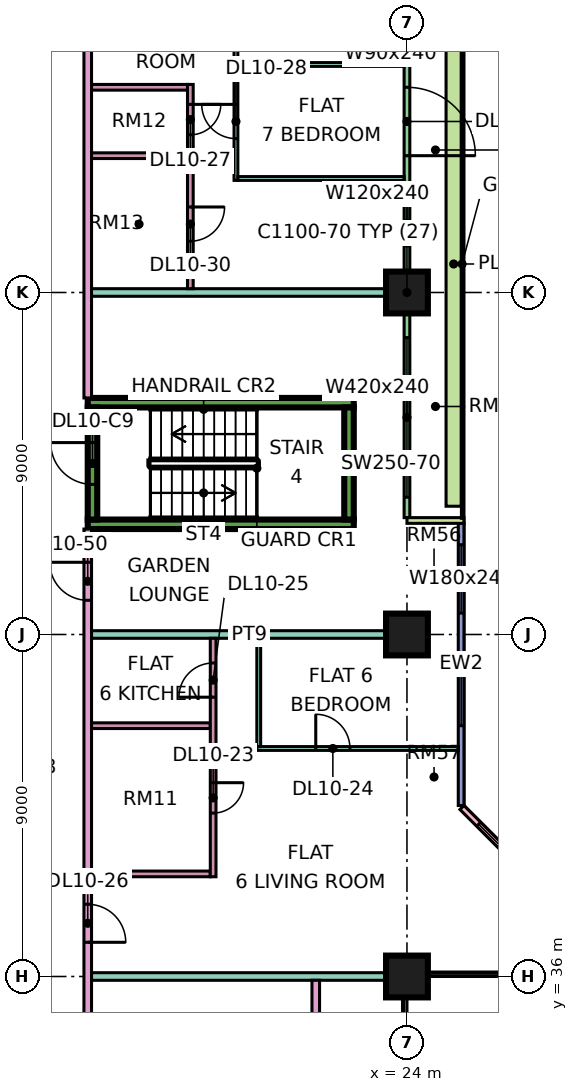
"""IFC4 building model, lengths in metres.
Left out: names, types, materials, properties, quantities, classifications, styles, units other than length and angle.
Written with IfcOpenShell. Run it as: python <this file> out.ifc"""

import sys

from ifc_helpers import new_model, si_unit, direction, frame, frame_2d, origin, origin_2d, place, context, subcontext, project, spatial, rectangle, extrude, element, fill, save


model = new_model("IFC4")
c1 = context("Model", 3, precision=1e-05, world=origin(), true_north=direction((0.0, 1.0)))
c2 = subcontext(c1, "Body", "Model", "MODEL_VIEW")
j1 = project(units=[si_unit("LENGTHUNIT", "METRE"), si_unit("PLANEANGLEUNIT", "RADIAN")], contexts=[c1])
p1 = place(None, origin())
s1 = spatial("IfcSite", under=j1, at=p1, CompositionType="ELEMENT")
p2 = place(p1, origin())
s2 = spatial("IfcBuilding", under=s1, at=p2, CompositionType="ELEMENT")
p3 = place(p2, frame((0.0, 0.0, 52.65)))
s3 = spatial("IfcBuildingStorey", under=s2, at=p3, CompositionType="ELEMENT", Elevation=52.65)
for number, where, z_axis, x_axis in (
    (1, (24.0, 36.0, 0.0), (0.0, 0.0, 1.0), (1.0, 0.0, 0.0)),
    (2, (24.0, 45.0, 0.0), (0.0, 0.0, 1.0), (1.0, 0.0, 0.0)),
    (3, (24.0, 54.0, 0.0), (0.0, 0.0, 1.0), (1.0, 0.0, 0.0)),
):
    element("IfcColumn", number, at=place(p3, frame(where, z_axis=z_axis, x_axis=x_axis)), inside=s3, PredefinedType="COLUMN", context=c2, shape_type="SweptSolid", body=[
        extrude(rectangle(XDim=1.1, YDim=1.1, at=origin_2d()), origin(), (0.0, 0.0, 1.0), 3.75),
    ])
for number, where, z_axis, x_axis in (
    (4, (15.6, 47.9, 0.0), (0.0, 0.0, 1.0), (1.0, 0.0, 0.0)),
    (5, (15.6, 51.1, 0.0), (0.0, 0.0, 1.0), (1.0, 0.0, 0.0)),
):
    element("IfcWall", number, at=place(p3, frame(where, z_axis=z_axis, x_axis=x_axis)), inside=s3, PredefinedType="SHEAR", context=c2, shape_type="SweptSolid", body=[
        extrude(rectangle(XDim=7.0, YDim=0.25, at=frame_2d((3.5, 0.0))), origin(), (0.0, 0.0, 1.0), 3.75),
    ])
p4 = place(p3, frame((15.725, 48.025, 0.0), z_axis=(0.0, 0.0, 1.0), x_axis=(0.0, 1.0, 0.0)))
e6 = element("IfcWall", 6, at=p4, inside=s3, PredefinedType="SHEAR", context=c2, shape_type="SweptSolid", body=[
    extrude(rectangle(XDim=2.95, YDim=0.25, at=frame_2d((1.475, 0.0))), origin(), (0.0, 0.0, 1.0), 3.75),
])
p5 = place(p4, frame((0.925, 0.0, 0.0)))
e7 = element("IfcOpeningElement", 7, at=p5, cuts=e6, PredefinedType="OPENING", context=c2, shape_type="SweptSolid", body=[
    extrude(rectangle(XDim=1.1, YDim=2.2, at=frame_2d((0.55, 1.1))), frame((0.0, 0.135, 0.0), z_axis=(0.0, -1.0, 0.0), x_axis=(1.0, 0.0, 0.0)), (0.0, 0.0, 1.0), 0.27),
])
p6 = place(p3, frame((22.475, 48.025, 0.0), z_axis=(0.0, 0.0, 1.0), x_axis=(0.0, 1.0, 0.0)))
e8 = element("IfcWall", 8, at=p6, inside=s3, PredefinedType="SHEAR", context=c2, shape_type="SweptSolid", body=[
    extrude(rectangle(XDim=2.95, YDim=0.25, at=frame_2d((1.475, 0.0))), origin(), (0.0, 0.0, 1.0), 3.75),
])
p7 = place(p3, frame((28.447, 37.447, 0.0), z_axis=(0.0, 0.0, 1.0), x_axis=(-0.707106781187, 0.707106781187, 0.0)))
e9 = element("IfcWall", 9, at=p7, inside=s3, PredefinedType="SOLIDWALL", context=c2, shape_type="SweptSolid", body=[
    extrude(rectangle(XDim=4.243, YDim=0.15, at=frame_2d((2.121, 0.0))), origin(), (0.0, 0.0, 1.0), 3.35),
])
p8 = place(p7, frame((0.621, 0.0, 0.45)))
e10 = element("IfcOpeningElement", 10, at=p8, cuts=e9, PredefinedType="OPENING", context=c2, shape_type="SweptSolid", body=[
    extrude(rectangle(XDim=3.0, YDim=2.4, at=frame_2d((1.5, 1.2))), frame((0.0, 0.085, 0.0), z_axis=(0.0, -1.0, 0.0), x_axis=(1.0, 0.0, 0.0)), (0.0, 0.0, 1.0), 0.17),
])
p9 = place(p3, frame((25.425, 40.5, 0.0), z_axis=(0.0, 0.0, 1.0), x_axis=(0.0, 1.0, 0.0)))
e11 = element("IfcWall", 11, at=p9, inside=s3, PredefinedType="SOLIDWALL", context=c2, shape_type="SweptSolid", body=[
    extrude(rectangle(XDim=7.425, YDim=0.15, at=frame_2d((3.712, 0.0))), origin(), (0.0, 0.0, 1.0), 3.35),
])
p10 = place(p9, frame((2.1, 0.0, 0.45)))
e12 = element("IfcOpeningElement", 12, at=p10, cuts=e11, PredefinedType="OPENING", context=c2, shape_type="SweptSolid", body=[
    extrude(rectangle(XDim=1.8, YDim=2.4, at=frame_2d((0.9, 1.2))), frame((0.0, 0.085, 0.0), z_axis=(0.0, -1.0, 0.0), x_axis=(1.0, 0.0, 0.0)), (0.0, 0.0, 1.0), 0.17),
])
p11 = place(p9, frame((5.062, 0.0, 0.45)))
e13 = element("IfcOpeningElement", 13, at=p11, cuts=e11, PredefinedType="OPENING", context=c2, shape_type="SweptSolid", body=[
    extrude(rectangle(XDim=1.8, YDim=2.4, at=frame_2d((0.9, 1.2))), frame((0.0, 0.085, 0.0), z_axis=(0.0, -1.0, 0.0), x_axis=(1.0, 0.0, 0.0)), (0.0, 0.0, 1.0), 0.17),
])
p12 = place(p3, frame((24.0, 48.075, 0.0), z_axis=(0.0, 0.0, 1.0), x_axis=(0.0, 1.0, 0.0)))
e14 = element("IfcWall", 14, at=p12, inside=s3, PredefinedType="SOLIDWALL", context=c2, shape_type="SweptSolid", body=[
    extrude(rectangle(XDim=13.35, YDim=0.15, at=frame_2d((6.675, 0.0))), origin(), (0.0, 0.0, 1.0), 3.35),
])
p13 = place(p12, frame((0.538, 0.0, 0.45)))
e15 = element("IfcOpeningElement", 15, at=p13, cuts=e14, PredefinedType="OPENING", context=c2, shape_type="SweptSolid", body=[
    extrude(rectangle(XDim=4.2, YDim=2.4, at=frame_2d((2.1, 1.2))), frame((0.0, 0.085, 0.0), z_axis=(0.0, -1.0, 0.0), x_axis=(1.0, 0.0, 0.0)), (0.0, 0.0, 1.0), 0.17),
])
p14 = place(p12, frame((7.15, 0.0, 0.45)))
e16 = element("IfcOpeningElement", 16, at=p14, cuts=e14, PredefinedType="OPENING", context=c2, shape_type="SweptSolid", body=[
    extrude(rectangle(XDim=1.2, YDim=2.4, at=frame_2d((0.6, 1.2))), frame((0.0, 0.085, 0.0), z_axis=(0.0, -1.0, 0.0), x_axis=(1.0, 0.0, 0.0)), (0.0, 0.0, 1.0), 0.17),
])
p15 = place(p12, frame((9.525, 0.0, 0.0)))
e17 = element("IfcOpeningElement", 17, at=p15, cuts=e14, PredefinedType="OPENING", context=c2, shape_type="SweptSolid", body=[
    extrude(rectangle(XDim=1.8, YDim=2.4, at=frame_2d((0.9, 1.2))), frame((0.0, 0.085, 0.0), z_axis=(0.0, -1.0, 0.0), x_axis=(1.0, 0.0, 0.0)), (0.0, 0.0, 1.0), 0.17),
])
p16 = place(p12, frame((12.188, 0.0, 0.45)))
e18 = element("IfcOpeningElement", 18, at=p16, cuts=e14, PredefinedType="OPENING", context=c2, shape_type="SweptSolid", body=[
    extrude(rectangle(XDim=0.9, YDim=2.4, at=frame_2d((0.45, 1.2))), frame((0.0, 0.085, 0.0), z_axis=(0.0, -1.0, 0.0), x_axis=(1.0, 0.0, 0.0)), (0.0, 0.0, 1.0), 0.17),
])
p17 = place(p3, frame((25.5, 48.0, 0.0), z_axis=(0.0, 0.0, 1.0), x_axis=(-1.0, 0.0, 0.0)))
e19 = element("IfcWall", 19, at=p17, inside=s3, PredefinedType="SOLIDWALL", context=c2, shape_type="SweptSolid", body=[
    extrude(rectangle(XDim=1.5, YDim=0.15, at=frame_2d((0.75, 0.0))), origin(), (0.0, 0.0, 1.0), 3.35),
])
p18 = place(p3, frame((25.229, 48.375, 0.0), z_axis=(0.0, 0.0, 1.0), x_axis=(0.0, 1.0, 0.0)))
e20 = element("IfcWall", 20, at=p18, inside=s3, PredefinedType="SOLIDWALL", context=c2, shape_type="SweptSolid", body=[
    extrude(rectangle(XDim=12.75, YDim=0.4, at=frame_2d((6.375, 0.0))), origin(), (0.0, 0.0, 1.0), 0.7),
])
p19 = place(p3, frame((15.6, 20.0, 0.0), z_axis=(0.0, 0.0, 1.0), x_axis=(0.0, 1.0, 0.0)))
e21 = element("IfcWall", 21, at=p19, inside=s3, PredefinedType="PARTITIONING", context=c2, shape_type="SweptSolid", body=[
    extrude(rectangle(XDim=27.775, YDim=0.2, at=frame_2d((13.887, 0.0))), origin(), (0.0, 0.0, 1.0), 3.35),
])
p20 = place(p19, frame((6.7, 0.0, 0.0)))
e22 = element("IfcOpeningElement", 22, at=p20, cuts=e21, PredefinedType="OPENING", context=c2, shape_type="SweptSolid", body=[
    extrude(rectangle(XDim=1.6, YDim=2.1, at=frame_2d((0.8, 1.05))), frame((0.0, 0.11, 0.0), z_axis=(0.0, -1.0, 0.0), x_axis=(1.0, 0.0, 0.0)), (0.0, 0.0, 1.0), 0.22),
])
p21 = place(p19, frame((12.95, 0.0, 0.0)))
e23 = element("IfcOpeningElement", 23, at=p21, cuts=e21, PredefinedType="OPENING", context=c2, shape_type="SweptSolid", body=[
    extrude(rectangle(XDim=1.0, YDim=2.1, at=frame_2d((0.5, 1.05))), frame((0.0, 0.11, 0.0), z_axis=(0.0, -1.0, 0.0), x_axis=(1.0, 0.0, 0.0)), (0.0, 0.0, 1.0), 0.22),
])
p22 = place(p19, frame((16.9, 0.0, 0.0)))
e24 = element("IfcOpeningElement", 24, at=p22, cuts=e21, PredefinedType="OPENING", context=c2, shape_type="SweptSolid", body=[
    extrude(rectangle(XDim=1.0, YDim=2.1, at=frame_2d((0.5, 1.05))), frame((0.0, 0.11, 0.0), z_axis=(0.0, -1.0, 0.0), x_axis=(1.0, 0.0, 0.0)), (0.0, 0.0, 1.0), 0.22),
])
p23 = place(p19, frame((1.15, 0.0, 0.0)))
e25 = element("IfcOpeningElement", 25, at=p23, cuts=e21, PredefinedType="OPENING", context=c2, shape_type="SweptSolid", body=[
    extrude(rectangle(XDim=1.8, YDim=2.1, at=frame_2d((0.9, 1.05))), frame((0.0, 0.11, 0.0), z_axis=(0.0, -1.0, 0.0), x_axis=(1.0, 0.0, 0.0)), (0.0, 0.0, 1.0), 0.22),
])
p24 = place(p19, frame((25.9, 0.0, 0.0)))
e26 = element("IfcOpeningElement", 26, at=p24, cuts=e21, PredefinedType="OPENING", context=c2, shape_type="SweptSolid", body=[
    extrude(rectangle(XDim=1.0, YDim=2.1, at=frame_2d((0.5, 1.05))), frame((0.0, 0.11, 0.0), z_axis=(0.0, -1.0, 0.0), x_axis=(1.0, 0.0, 0.0)), (0.0, 0.0, 1.0), 0.22),
])
p25 = place(p3, frame((15.6, 51.225, 0.0), z_axis=(0.0, 0.0, 1.0), x_axis=(0.0, 1.0, 0.0)))
e27 = element("IfcWall", 27, at=p25, inside=s3, PredefinedType="PARTITIONING", context=c2, shape_type="SweptSolid", body=[
    extrude(rectangle(XDim=13.125, YDim=0.2, at=frame_2d((6.562, 0.0))), origin(), (0.0, 0.0, 1.0), 3.35),
])
p26 = place(p25, frame((9.525, 0.0, 0.0)))
e28 = element("IfcOpeningElement", 28, at=p26, cuts=e27, PredefinedType="OPENING", context=c2, shape_type="SweptSolid", body=[
    extrude(rectangle(XDim=1.0, YDim=2.1, at=frame_2d((0.5, 1.05))), frame((0.0, 0.11, 0.0), z_axis=(0.0, -1.0, 0.0), x_axis=(1.0, 0.0, 0.0)), (0.0, 0.0, 1.0), 0.22),
])
p27 = place(p3, frame((15.7, 36.0, 0.0), z_axis=(0.0, 0.0, 1.0), x_axis=(1.0, 0.0, 0.0)))
e29 = element("IfcWall", 29, at=p27, inside=s3, PredefinedType="PARTITIONING", context=c2, shape_type="SweptSolid", body=[
    extrude(rectangle(XDim=8.3, YDim=0.2, at=frame_2d((4.15, 0.0))), origin(), (0.0, 0.0, 1.0), 3.35),
])
for number, where, z_axis, x_axis in (
    (30, (15.7, 38.7, 0.0), (0.0, 0.0, 1.0), (1.0, 0.0, 0.0)),
    (31, (15.7, 42.6, 0.0), (0.0, 0.0, 1.0), (1.0, 0.0, 0.0)),
):
    element("IfcWall", number, at=place(p3, frame(where, z_axis=z_axis, x_axis=x_axis)), inside=s3, PredefinedType="PARTITIONING", context=c2, shape_type="SweptSolid", body=[
        extrude(rectangle(XDim=3.125, YDim=0.15, at=frame_2d((1.562, 0.0))), origin(), (0.0, 0.0, 1.0), 3.35),
    ])
p28 = place(p3, frame((15.7, 45.0, 0.0), z_axis=(0.0, 0.0, 1.0), x_axis=(1.0, 0.0, 0.0)))
e32 = element("IfcWall", 32, at=p28, inside=s3, PredefinedType="PARTITIONING", context=c2, shape_type="SweptSolid", body=[
    extrude(rectangle(XDim=8.3, YDim=0.2, at=frame_2d((4.15, 0.0))), origin(), (0.0, 0.0, 1.0), 3.35),
])
p29 = place(p3, frame((15.7, 54.0, 0.0), z_axis=(0.0, 0.0, 1.0), x_axis=(1.0, 0.0, 0.0)))
e33 = element("IfcWall", 33, at=p29, inside=s3, PredefinedType="PARTITIONING", context=c2, shape_type="SweptSolid", body=[
    extrude(rectangle(XDim=8.226, YDim=0.2, at=frame_2d((4.113, 0.0))), origin(), (0.0, 0.0, 1.0), 3.35),
])
for number, where, z_axis, x_axis in (
    (34, (15.7, 57.6, 0.0), (0.0, 0.0, 1.0), (1.0, 0.0, 0.0)),
    (35, (15.7, 59.4, 0.0), (0.0, 0.0, 1.0), (1.0, 0.0, 0.0)),
):
    element("IfcWall", number, at=place(p3, frame(where, z_axis=z_axis, x_axis=x_axis)), inside=s3, PredefinedType="PARTITIONING", context=c2, shape_type="SweptSolid", body=[
        extrude(rectangle(XDim=2.525, YDim=0.15, at=frame_2d((1.263, 0.0))), origin(), (0.0, 0.0, 1.0), 3.35),
    ])
p30 = place(p3, frame((18.3, 54.1, 0.0), z_axis=(0.0, 0.0, 1.0), x_axis=(0.0, 1.0, 0.0)))
e36 = element("IfcWall", 36, at=p30, inside=s3, PredefinedType="PARTITIONING", context=c2, shape_type="SweptSolid", body=[
    extrude(rectangle(XDim=5.375, YDim=0.15, at=frame_2d((2.688, 0.0))), origin(), (0.0, 0.0, 1.0), 3.35),
])
p31 = place(p30, frame((4.05, 0.0, 0.0)))
e37 = element("IfcOpeningElement", 37, at=p31, cuts=e36, PredefinedType="OPENING", context=c2, shape_type="SweptSolid", body=[
    extrude(rectangle(XDim=0.8, YDim=2.1, at=frame_2d((0.4, 1.05))), frame((0.0, 0.085, 0.0), z_axis=(0.0, -1.0, 0.0), x_axis=(1.0, 0.0, 0.0)), (0.0, 0.0, 1.0), 0.17),
])
p32 = place(p30, frame((1.25, 0.0, 0.0)))
e38 = element("IfcOpeningElement", 38, at=p32, cuts=e36, PredefinedType="OPENING", context=c2, shape_type="SweptSolid", body=[
    extrude(rectangle(XDim=0.9, YDim=2.1, at=frame_2d((0.45, 1.05))), frame((0.0, 0.085, 0.0), z_axis=(0.0, -1.0, 0.0), x_axis=(1.0, 0.0, 0.0)), (0.0, 0.0, 1.0), 0.17),
])
p33 = place(p3, frame((18.9, 38.625, 0.0), z_axis=(0.0, 0.0, 1.0), x_axis=(0.0, 1.0, 0.0)))
e39 = element("IfcWall", 39, at=p33, inside=s3, PredefinedType="PARTITIONING", context=c2, shape_type="SweptSolid", body=[
    extrude(rectangle(XDim=6.275, YDim=0.15, at=frame_2d((3.137, 0.0))), origin(), (0.0, 0.0, 1.0), 3.35),
])
p34 = place(p33, frame((1.675, 0.0, 0.0)))
e40 = element("IfcOpeningElement", 40, at=p34, cuts=e39, PredefinedType="OPENING", context=c2, shape_type="SweptSolid", body=[
    extrude(rectangle(XDim=0.8, YDim=2.1, at=frame_2d((0.4, 1.05))), frame((0.0, 0.085, 0.0), z_axis=(0.0, -1.0, 0.0), x_axis=(1.0, 0.0, 0.0)), (0.0, 0.0, 1.0), 0.17),
])
p35 = place(p33, frame((4.725, 0.0, 0.0)))
e41 = element("IfcOpeningElement", 41, at=p35, cuts=e39, PredefinedType="OPENING", context=c2, shape_type="SweptSolid", body=[
    extrude(rectangle(XDim=0.9, YDim=2.1, at=frame_2d((0.45, 1.05))), frame((0.0, 0.085, 0.0), z_axis=(0.0, -1.0, 0.0), x_axis=(1.0, 0.0, 0.0)), (0.0, 0.0, 1.0), 0.17),
])
p36 = place(p3, frame((19.5, 56.95, 0.0), z_axis=(0.0, 0.0, 1.0), x_axis=(0.0, 1.0, 0.0)))
e42 = element("IfcWall", 42, at=p36, inside=s3, PredefinedType="PARTITIONING", context=c2, shape_type="SweptSolid", body=[
    extrude(rectangle(XDim=7.4, YDim=0.1, at=frame_2d((3.7, 0.0))), origin(), (0.0, 0.0, 1.0), 3.35),
])
p37 = place(p36, frame((1.1, 0.0, 0.0)))
e43 = element("IfcOpeningElement", 43, at=p37, cuts=e42, PredefinedType="OPENING", context=c2, shape_type="SweptSolid", body=[
    extrude(rectangle(XDim=0.9, YDim=2.1, at=frame_2d((0.45, 1.05))), frame((0.0, 0.06, 0.0), z_axis=(0.0, -1.0, 0.0), x_axis=(1.0, 0.0, 0.0)), (0.0, 0.0, 1.0), 0.12),
])
p38 = place(p36, frame((4.1, 0.0, 0.0)))
e44 = element("IfcOpeningElement", 44, at=p38, cuts=e42, PredefinedType="OPENING", context=c2, shape_type="SweptSolid", body=[
    extrude(rectangle(XDim=0.9, YDim=2.1, at=frame_2d((0.45, 1.05))), frame((0.0, 0.06, 0.0), z_axis=(0.0, -1.0, 0.0), x_axis=(1.0, 0.0, 0.0)), (0.0, 0.0, 1.0), 0.12),
])
for number, where, z_axis, x_axis in (
    (45, (19.55, 57.0, 0.0), (0.0, 0.0, 1.0), (1.0, 0.0, 0.0)),
    (46, (19.55, 60.0, 0.0), (0.0, 0.0, 1.0), (1.0, 0.0, 0.0)),
):
    element("IfcWall", number, at=place(p3, frame(where, z_axis=z_axis, x_axis=x_axis)), inside=s3, PredefinedType="PARTITIONING", context=c2, shape_type="SweptSolid", body=[
        extrude(rectangle(XDim=4.376, YDim=0.1, at=frame_2d((2.188, 0.0))), origin(), (0.0, 0.0, 1.0), 3.35),
    ])
p39 = place(p3, frame((20.05, 42.0, 0.0), z_axis=(0.0, 0.0, 1.0), x_axis=(1.0, 0.0, 0.0)))
e47 = element("IfcWall", 47, at=p39, inside=s3, PredefinedType="PARTITIONING", context=c2, shape_type="SweptSolid", body=[
    extrude(rectangle(XDim=5.3, YDim=0.1, at=frame_2d((2.65, 0.0))), origin(), (0.0, 0.0, 1.0), 3.35),
])
p40 = place(p39, frame((1.55, 0.0, 0.0)))
e48 = element("IfcOpeningElement", 48, at=p40, cuts=e47, PredefinedType="OPENING", context=c2, shape_type="SweptSolid", body=[
    extrude(rectangle(XDim=0.9, YDim=2.1, at=frame_2d((0.45, 1.05))), frame((0.0, 0.06, 0.0), z_axis=(0.0, -1.0, 0.0), x_axis=(1.0, 0.0, 0.0)), (0.0, 0.0, 1.0), 0.12),
])
p41 = place(p3, frame((20.1, 42.05, 0.0), z_axis=(0.0, 0.0, 1.0), x_axis=(0.0, 1.0, 0.0)))
e49 = element("IfcWall", 49, at=p41, inside=s3, PredefinedType="PARTITIONING", context=c2, shape_type="SweptSolid", body=[
    extrude(rectangle(XDim=2.85, YDim=0.1, at=frame_2d((1.425, 0.0))), origin(), (0.0, 0.0, 1.0), 3.35),
])
p42 = place(p3, frame((21.6, 23.9, 0.0), z_axis=(0.0, 0.0, 1.0), x_axis=(0.0, 1.0, 0.0)))
e50 = element("IfcWall", 50, at=p42, inside=s3, PredefinedType="PARTITIONING", context=c2, shape_type="SweptSolid", body=[
    extrude(rectangle(XDim=12.0, YDim=0.2, at=frame_2d((6.0, 0.0))), origin(), (0.0, 0.0, 1.0), 3.35),
])
p43 = place(p8, origin())
e51 = element("IfcWindow", 51, at=p43, inside=s3, PartitioningType="SINGLE_PANEL", PredefinedType="WINDOW", context=c2, shape_type="SweptSolid", body=[
    extrude(rectangle(XDim=3.0, YDim=2.4, at=frame_2d((1.5, 1.2))), frame((0.0, 0.03, 0.0), z_axis=(0.0, -1.0, 0.0), x_axis=(1.0, 0.0, 0.0)), (0.0, 0.0, 1.0), 0.06),
])
fill(e10, e51)
p44 = place(p10, origin())
e52 = element("IfcWindow", 52, at=p44, inside=s3, PartitioningType="SINGLE_PANEL", PredefinedType="WINDOW", context=c2, shape_type="SweptSolid", body=[
    extrude(rectangle(XDim=1.8, YDim=2.4, at=frame_2d((0.9, 1.2))), frame((0.0, 0.03, 0.0), z_axis=(0.0, -1.0, 0.0), x_axis=(1.0, 0.0, 0.0)), (0.0, 0.0, 1.0), 0.06),
])
fill(e12, e52)
p45 = place(p11, origin())
e53 = element("IfcWindow", 53, at=p45, inside=s3, PartitioningType="SINGLE_PANEL", PredefinedType="WINDOW", context=c2, shape_type="SweptSolid", body=[
    extrude(rectangle(XDim=1.8, YDim=2.4, at=frame_2d((0.9, 1.2))), frame((0.0, 0.03, 0.0), z_axis=(0.0, -1.0, 0.0), x_axis=(1.0, 0.0, 0.0)), (0.0, 0.0, 1.0), 0.06),
])
fill(e13, e53)
p46 = place(p13, origin())
e54 = element("IfcWindow", 54, at=p46, inside=s3, PartitioningType="SINGLE_PANEL", PredefinedType="WINDOW", context=c2, shape_type="SweptSolid", body=[
    extrude(rectangle(XDim=4.2, YDim=2.4, at=frame_2d((2.1, 1.2))), frame((0.0, 0.03, 0.0), z_axis=(0.0, -1.0, 0.0), x_axis=(1.0, 0.0, 0.0)), (0.0, 0.0, 1.0), 0.06),
])
fill(e15, e54)
p47 = place(p14, origin())
e55 = element("IfcWindow", 55, at=p47, inside=s3, PartitioningType="SINGLE_PANEL", PredefinedType="WINDOW", context=c2, shape_type="SweptSolid", body=[
    extrude(rectangle(XDim=1.2, YDim=2.4, at=frame_2d((0.6, 1.2))), frame((0.0, 0.03, 0.0), z_axis=(0.0, -1.0, 0.0), x_axis=(1.0, 0.0, 0.0)), (0.0, 0.0, 1.0), 0.06),
])
fill(e16, e55)
p48 = place(p15, frame((1.8, 0.0, 0.0), z_axis=(0.0, 0.0, 1.0), x_axis=(-1.0, 0.0, 0.0)))
e56 = element("IfcDoor", 56, at=p48, inside=s3, OperationType="DOUBLE_DOOR_SINGLE_SWING", PredefinedType="DOOR", context=c2, shape_type="SweptSolid", body=[
    extrude(rectangle(XDim=1.8, YDim=2.4, at=frame_2d((0.9, 1.2))), frame((0.0, 0.025, 0.0), z_axis=(0.0, -1.0, 0.0), x_axis=(1.0, 0.0, 0.0)), (0.0, 0.0, 1.0), 0.05),
])
fill(e17, e56)
p49 = place(p16, origin())
e57 = element("IfcWindow", 57, at=p49, inside=s3, PartitioningType="SINGLE_PANEL", PredefinedType="WINDOW", context=c2, shape_type="SweptSolid", body=[
    extrude(rectangle(XDim=0.9, YDim=2.4, at=frame_2d((0.45, 1.2))), frame((0.0, 0.03, 0.0), z_axis=(0.0, -1.0, 0.0), x_axis=(1.0, 0.0, 0.0)), (0.0, 0.0, 1.0), 0.06),
])
fill(e18, e57)
p50 = place(p5, frame((1.1, 0.0, 0.0), z_axis=(0.0, 0.0, 1.0), x_axis=(-1.0, 0.0, 0.0)))
e58 = element("IfcDoor", 58, at=p50, inside=s3, OperationType="SINGLE_SWING_RIGHT", PredefinedType="DOOR", context=c2, shape_type="SweptSolid", body=[
    extrude(rectangle(XDim=1.1, YDim=2.2, at=frame_2d((0.55, 1.1))), frame((0.0, 0.025, 0.0), z_axis=(0.0, -1.0, 0.0), x_axis=(1.0, 0.0, 0.0)), (0.0, 0.0, 1.0), 0.05),
])
fill(e7, e58)
p51 = place(p34, origin())
e59 = element("IfcDoor", 59, at=p51, inside=s3, OperationType="SINGLE_SWING_RIGHT", PredefinedType="DOOR", context=c2, shape_type="SweptSolid", body=[
    extrude(rectangle(XDim=0.8, YDim=2.1, at=frame_2d((0.4, 1.05))), frame((0.0, 0.025, 0.0), z_axis=(0.0, -1.0, 0.0), x_axis=(1.0, 0.0, 0.0)), (0.0, 0.0, 1.0), 0.05),
])
fill(e40, e59)
p52 = place(p40, origin())
e60 = element("IfcDoor", 60, at=p52, inside=s3, OperationType="SINGLE_SWING_LEFT", PredefinedType="DOOR", context=c2, shape_type="SweptSolid", body=[
    extrude(rectangle(XDim=0.9, YDim=2.1, at=frame_2d((0.45, 1.05))), frame((0.0, 0.025, 0.0), z_axis=(0.0, -1.0, 0.0), x_axis=(1.0, 0.0, 0.0)), (0.0, 0.0, 1.0), 0.05),
])
fill(e48, e60)
p53 = place(p35, origin())
e61 = element("IfcDoor", 61, at=p53, inside=s3, OperationType="SINGLE_SWING_LEFT", PredefinedType="DOOR", context=c2, shape_type="SweptSolid", body=[
    extrude(rectangle(XDim=0.9, YDim=2.1, at=frame_2d((0.45, 1.05))), frame((0.0, 0.025, 0.0), z_axis=(0.0, -1.0, 0.0), x_axis=(1.0, 0.0, 0.0)), (0.0, 0.0, 1.0), 0.05),
])
fill(e41, e61)
p54 = place(p22, frame((1.0, 0.0, 0.0), z_axis=(0.0, 0.0, 1.0), x_axis=(-1.0, 0.0, 0.0)))
e62 = element("IfcDoor", 62, at=p54, inside=s3, OperationType="SINGLE_SWING_LEFT", PredefinedType="DOOR", context=c2, shape_type="SweptSolid", body=[
    extrude(rectangle(XDim=1.0, YDim=2.1, at=frame_2d((0.5, 1.05))), frame((0.0, 0.025, 0.0), z_axis=(0.0, -1.0, 0.0), x_axis=(1.0, 0.0, 0.0)), (0.0, 0.0, 1.0), 0.05),
])
fill(e24, e62)
p55 = place(p31, origin())
e63 = element("IfcDoor", 63, at=p55, inside=s3, OperationType="SINGLE_SWING_RIGHT", PredefinedType="DOOR", context=c2, shape_type="SweptSolid", body=[
    extrude(rectangle(XDim=0.8, YDim=2.1, at=frame_2d((0.4, 1.05))), frame((0.0, 0.025, 0.0), z_axis=(0.0, -1.0, 0.0), x_axis=(1.0, 0.0, 0.0)), (0.0, 0.0, 1.0), 0.05),
])
fill(e37, e63)
p56 = place(p37, frame((0.9, 0.0, 0.0), z_axis=(0.0, 0.0, 1.0), x_axis=(-1.0, 0.0, 0.0)))
e64 = element("IfcDoor", 64, at=p56, inside=s3, OperationType="SINGLE_SWING_RIGHT", PredefinedType="DOOR", context=c2, shape_type="SweptSolid", body=[
    extrude(rectangle(XDim=0.9, YDim=2.1, at=frame_2d((0.45, 1.05))), frame((0.0, 0.025, 0.0), z_axis=(0.0, -1.0, 0.0), x_axis=(1.0, 0.0, 0.0)), (0.0, 0.0, 1.0), 0.05),
])
fill(e43, e64)
p57 = place(p32, origin())
e65 = element("IfcDoor", 65, at=p57, inside=s3, OperationType="SINGLE_SWING_RIGHT", PredefinedType="DOOR", context=c2, shape_type="SweptSolid", body=[
    extrude(rectangle(XDim=0.9, YDim=2.1, at=frame_2d((0.45, 1.05))), frame((0.0, 0.025, 0.0), z_axis=(0.0, -1.0, 0.0), x_axis=(1.0, 0.0, 0.0)), (0.0, 0.0, 1.0), 0.05),
])
fill(e38, e65)
p58 = place(p24, frame((1.0, 0.0, 0.0), z_axis=(0.0, 0.0, 1.0), x_axis=(-1.0, 0.0, 0.0)))
e66 = element("IfcDoor", 66, at=p58, inside=s3, OperationType="SINGLE_SWING_RIGHT", PredefinedType="DOOR", context=c2, shape_type="SweptSolid", body=[
    extrude(rectangle(XDim=1.0, YDim=2.1, at=frame_2d((0.5, 1.05))), frame((0.0, 0.025, 0.0), z_axis=(0.0, -1.0, 0.0), x_axis=(1.0, 0.0, 0.0)), (0.0, 0.0, 1.0), 0.05),
])
fill(e26, e66)
save(model, sys.argv[1])
